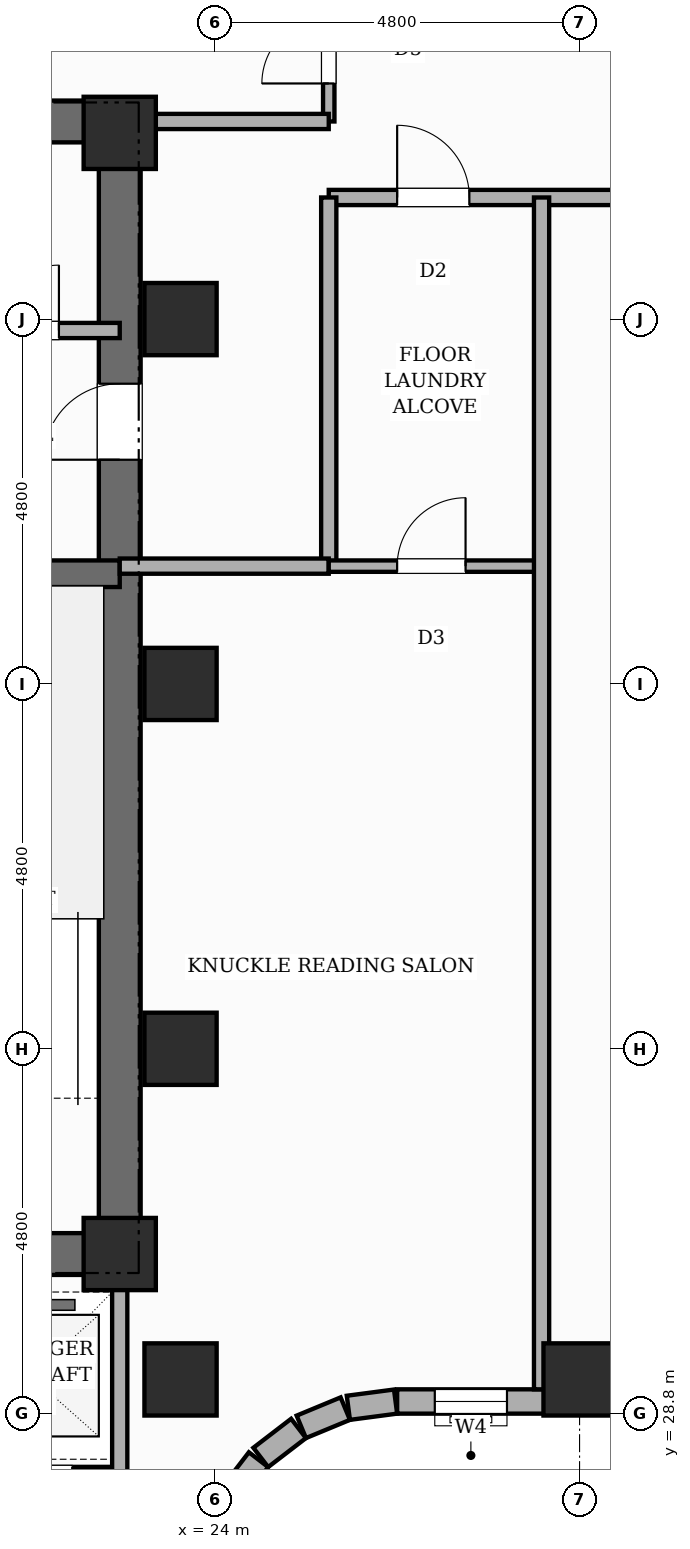
"""IFC4 building model, lengths in metres.
Left out: names, types, materials, properties, quantities, classifications, styles, units other than length and angle.
Written with IfcOpenShell. Run it as: python <this file> out.ifc"""

import sys

from ifc_helpers import new_model, si_unit, direction, frame, frame_2d, origin, origin_2d, place, context, subcontext, project, spatial, rectangle, extrude, element, fill, save


model = new_model("IFC4")
c1 = context("Model", 3, precision=1e-05, world=origin(), true_north=direction((0.0, 1.0)))
c2 = subcontext(c1, "Body", "Model", "MODEL_VIEW")
j1 = project(units=[si_unit("LENGTHUNIT", "METRE"), si_unit("PLANEANGLEUNIT", "RADIAN")], contexts=[c1])
p1 = place(None, origin())
s1 = spatial("IfcSite", under=j1, at=p1, CompositionType="ELEMENT")
p2 = place(p1, origin())
s2 = spatial("IfcBuilding", under=s1, at=p2, CompositionType="ELEMENT")
p3 = place(p2, frame((0.0, 0.0, 110.8)))
s3 = spatial("IfcBuildingStorey", under=s2, at=p3, CompositionType="ELEMENT", Elevation=110.8)
p4 = place(p3, frame((22.75, 30.625, 0.0), z_axis=(0.0, 0.0, 1.0), x_axis=(0.0, 1.0, 0.0)))
e1 = element("IfcWall", 1, at=p4, inside=s3, PredefinedType="SHEAR", context=c2, shape_type="SweptSolid", body=[
    extrude(rectangle(XDim=15.45, YDim=0.55, at=frame_2d((7.725, 0.0))), origin(), (0.0, 0.0, 1.0), 3.6),
])
p5 = place(p4, frame((10.725, 0.0, 0.0)))
e2 = element("IfcOpeningElement", 2, at=p5, cuts=e1, PredefinedType="OPENING", context=c2, shape_type="SweptSolid", body=[
    extrude(rectangle(XDim=1.0, YDim=2.15, at=frame_2d((0.5, 1.075))), frame((0.0, 0.285, 0.0), z_axis=(0.0, -1.0, 0.0), x_axis=(1.0, 0.0, 0.0)), (0.0, 0.0, 1.0), 0.57),
])
p6 = place(p3, frame((6.05, 45.8, 0.0), z_axis=(0.0, 0.0, 1.0), x_axis=(1.0, 0.0, 0.0)))
e3 = element("IfcWall", 3, at=p6, inside=s3, PredefinedType="SHEAR", context=c2, shape_type="SweptSolid", body=[
    extrude(rectangle(XDim=16.7, YDim=0.55, at=frame_2d((8.35, 0.0))), origin(), (0.0, 0.0, 1.0), 3.6),
])
p7 = place(p3, frame((18.84, 30.9, 0.0), z_axis=(0.0, 0.0, 1.0), x_axis=(1.0, 0.0, 0.0)))
e4 = element("IfcWall", 4, at=p7, inside=s3, PredefinedType="SHEAR", context=c2, shape_type="SweptSolid", body=[
    extrude(rectangle(XDim=3.91, YDim=0.55, at=frame_2d((1.955, 0.0))), origin(), (0.0, 0.0, 1.0), 3.6),
])
p8 = place(p3, frame((18.84, 39.85, 0.0), z_axis=(0.0, 0.0, 1.0), x_axis=(1.0, 0.0, 0.0)))
e5 = element("IfcWall", 5, at=p8, inside=s3, PredefinedType="SHEAR", context=c2, shape_type="SweptSolid", body=[
    extrude(rectangle(XDim=3.91, YDim=0.35, at=frame_2d((1.955, 0.0))), origin(), (0.0, 0.0, 1.0), 3.6),
])
for number, where, z_axis, x_axis in (
    (6, (22.75, 30.9, 0.0), (0.0, 0.0, 1.0), (1.0, 0.0, 0.0)),
    (7, (22.75, 45.65, 0.0), (0.0, 0.0, 1.0), (1.0, 0.0, 0.0)),
    (8, (23.55, 29.25, 0.0), (0.0, 0.0, 1.0), (1.0, 0.0, 0.0)),
    (9, (23.55, 33.6, 0.0), (0.0, 0.0, 1.0), (1.0, 0.0, 0.0)),
    (10, (23.55, 38.4, 0.0), (0.0, 0.0, 1.0), (1.0, 0.0, 0.0)),
    (11, (23.55, 43.2, 0.0), (0.0, 0.0, 1.0), (1.0, 0.0, 0.0)),
    (12, (28.8, 29.25, 0.0), (0.0, 0.0, 1.0), (1.0, 0.0, 0.0)),
):
    element("IfcColumn", number, at=place(p3, frame(where, z_axis=z_axis, x_axis=x_axis)), inside=s3, PredefinedType="COLUMN", context=c2, shape_type="SweptSolid", body=[
        extrude(rectangle(XDim=0.95, YDim=0.95, at=origin_2d()), origin(), (0.0, 0.0, 1.0), 3.6),
    ])
p9 = place(p3, frame((50.4, 28.96, 0.0), z_axis=(0.0, 0.0, 1.0), x_axis=(-1.0, 0.0, 0.0)))
e13 = element("IfcWall", 13, at=p9, inside=s3, PredefinedType="STANDARD", context=c2, shape_type="SweptSolid", body=[
    extrude(rectangle(XDim=24.0, YDim=0.32, at=frame_2d((12.0, 0.0))), origin(), (0.0, 0.0, 1.0), 2.54),
])
p10 = place(p9, frame((19.278, 0.0, 0.65)))
e14 = element("IfcOpeningElement", 14, at=p10, cuts=e13, PredefinedType="OPENING", context=c2, shape_type="SweptSolid", body=[
    extrude(rectangle(XDim=1.4, YDim=1.1, at=frame_2d((0.7, 0.55))), frame((0.0, 0.17, 0.0), z_axis=(0.0, -1.0, 0.0), x_axis=(1.0, 0.0, 0.0)), (0.0, 0.0, 1.0), 0.34),
])
p11 = place(p9, frame((13.76, 0.0, 0.65)))
e15 = element("IfcOpeningElement", 15, at=p11, cuts=e13, PredefinedType="OPENING", context=c2, shape_type="SweptSolid", body=[
    extrude(rectangle(XDim=1.4, YDim=1.1, at=frame_2d((0.7, 0.55))), frame((0.0, 0.17, 0.0), z_axis=(0.0, -1.0, 0.0), x_axis=(1.0, 0.0, 0.0)), (0.0, 0.0, 1.0), 0.34),
])
p12 = place(p9, frame((22.555, 0.0, 0.45)))
e16 = element("IfcOpeningElement", 16, at=p12, cuts=e13, PredefinedType="OPENING", context=c2, shape_type="SweptSolid", body=[
    extrude(rectangle(XDim=0.95, YDim=1.8, at=frame_2d((0.475, 0.9))), frame((0.0, 0.17, 0.0), z_axis=(0.0, -1.0, 0.0), x_axis=(1.0, 0.0, 0.0)), (0.0, 0.0, 1.0), 0.34),
])
p13 = place(p9, frame((4.1, 0.0, 0.65)))
e17 = element("IfcOpeningElement", 17, at=p13, cuts=e13, PredefinedType="OPENING", context=c2, shape_type="SweptSolid", body=[
    extrude(rectangle(XDim=1.4, YDim=1.1, at=frame_2d((0.7, 0.55))), frame((0.0, 0.17, 0.0), z_axis=(0.0, -1.0, 0.0), x_axis=(1.0, 0.0, 0.0)), (0.0, 0.0, 1.0), 0.34),
])
p14 = place(p9, frame((17.598, 0.0, 0.45)))
e18 = element("IfcOpeningElement", 18, at=p14, cuts=e13, PredefinedType="OPENING", context=c2, shape_type="SweptSolid", body=[
    extrude(rectangle(XDim=0.95, YDim=1.8, at=frame_2d((0.475, 0.9))), frame((0.0, 0.17, 0.0), z_axis=(0.0, -1.0, 0.0), x_axis=(1.0, 0.0, 0.0)), (0.0, 0.0, 1.0), 0.34),
])
p15 = place(p9, frame((9.413, 0.0, 0.65)))
e19 = element("IfcOpeningElement", 19, at=p15, cuts=e13, PredefinedType="OPENING", context=c2, shape_type="SweptSolid", body=[
    extrude(rectangle(XDim=1.4, YDim=1.1, at=frame_2d((0.7, 0.55))), frame((0.0, 0.17, 0.0), z_axis=(0.0, -1.0, 0.0), x_axis=(1.0, 0.0, 0.0)), (0.0, 0.0, 1.0), 0.34),
])
p16 = place(p9, frame((0.656, 0.0, 0.45)))
e20 = element("IfcOpeningElement", 20, at=p16, cuts=e13, PredefinedType="OPENING", context=c2, shape_type="SweptSolid", body=[
    extrude(rectangle(XDim=0.95, YDim=1.8, at=frame_2d((0.475, 0.9))), frame((0.0, 0.17, 0.0), z_axis=(0.0, -1.0, 0.0), x_axis=(1.0, 0.0, 0.0)), (0.0, 0.0, 1.0), 0.34),
])
p17 = place(p3, frame((26.379, 28.958, 0.0), z_axis=(0.0, 0.0, 1.0), x_axis=(-0.991447664465, -0.130504898859, 0.0)))
e21 = element("IfcWall", 21, at=p17, inside=s3, PredefinedType="STANDARD", context=c2, shape_type="SweptSolid", body=[
    extrude(rectangle(XDim=0.627, YDim=0.32, at=frame_2d((0.313, 0.0))), origin(), (0.0, 0.0, 1.0), 2.54),
])
p18 = place(p3, frame((25.718, 28.866, 0.0), z_axis=(0.0, 0.0, 1.0), x_axis=(-0.923836271867, -0.382787856107, 0.0)))
e22 = element("IfcWall", 22, at=p18, inside=s3, PredefinedType="STANDARD", context=c2, shape_type="SweptSolid", body=[
    extrude(rectangle(XDim=0.626, YDim=0.32, at=frame_2d((0.313, 0.0))), origin(), (0.0, 0.0, 1.0), 3.36),
])
for number, where, z_axis, x_axis in (
    (23, (25.103, 28.605, 0.0), (0.0, 0.0, 1.0), (-0.793, -0.609, 0.0)),
    (24, (24.576, 28.195, 0.0), (0.0, 0.0, 1.0), (-0.609, -0.793, 0.0)),
):
    element("IfcWall", number, at=place(p3, frame(where, z_axis=z_axis, x_axis=x_axis)), inside=s3, PredefinedType="STANDARD", context=c2, shape_type="SweptSolid", body=[
        extrude(rectangle(XDim=0.626, YDim=0.32, at=frame_2d((0.313, 0.0))), origin(), (0.0, 0.0, 1.0), 3.36),
    ])
p19 = place(p3, frame((18.84, 43.05, 0.0), z_axis=(0.0, 0.0, 1.0), x_axis=(1.0, 0.0, 0.0)))
e25 = element("IfcWall", 25, at=p19, inside=s3, PredefinedType="POLYGONAL", context=c2, shape_type="SweptSolid", body=[
    extrude(rectangle(XDim=3.91, YDim=0.2, at=frame_2d((1.955, 0.0))), origin(), (0.0, 0.0, 1.0), 2.54),
])
p20 = place(p19, frame((0.55, 0.0, 0.0)))
e26 = element("IfcOpeningElement", 26, at=p20, cuts=e25, PredefinedType="OPENING", context=c2, shape_type="SweptSolid", body=[
    extrude(rectangle(XDim=0.88, YDim=2.1, at=frame_2d((0.44, 1.05))), frame((0.0, 0.11, 0.0), z_axis=(0.0, -1.0, 0.0), x_axis=(1.0, 0.0, 0.0)), (0.0, 0.0, 1.0), 0.22),
])
p21 = place(p19, frame((2.25, 0.0, 0.0)))
e27 = element("IfcOpeningElement", 27, at=p21, cuts=e25, PredefinedType="OPENING", context=c2, shape_type="SweptSolid", body=[
    extrude(rectangle(XDim=0.86, YDim=2.1, at=frame_2d((0.43, 1.05))), frame((0.0, 0.11, 0.0), z_axis=(0.0, -1.0, 0.0), x_axis=(1.0, 0.0, 0.0)), (0.0, 0.0, 1.0), 0.22),
])
p22 = place(p3, frame((15.5, 28.0, 0.0), z_axis=(0.0, 0.0, 1.0), x_axis=(1.0, 0.0, 0.0)))
e28 = element("IfcWall", 28, at=p22, inside=s3, PredefinedType="POLYGONAL", context=c2, shape_type="SweptSolid", body=[
    extrude(rectangle(XDim=7.25, YDim=0.2, at=frame_2d((3.625, 0.0))), origin(), (0.0, 0.0, 1.0), 3.36),
])
p23 = place(p22, frame((0.625, 0.0, 0.0)))
e29 = element("IfcOpeningElement", 29, at=p23, cuts=e28, PredefinedType="OPENING", context=c2, shape_type="SweptSolid", body=[
    extrude(rectangle(XDim=1.1, YDim=2.15, at=frame_2d((0.55, 1.075))), frame((0.0, 0.11, 0.0), z_axis=(0.0, -1.0, 0.0), x_axis=(1.0, 0.0, 0.0)), (0.0, 0.0, 1.0), 0.22),
])
p24 = place(p22, frame((3.075, 0.0, 0.0)))
e30 = element("IfcOpeningElement", 30, at=p24, cuts=e28, PredefinedType="OPENING", context=c2, shape_type="SweptSolid", body=[
    extrude(rectangle(XDim=1.1, YDim=2.15, at=frame_2d((0.55, 1.075))), frame((0.0, 0.11, 0.0), z_axis=(0.0, -1.0, 0.0), x_axis=(1.0, 0.0, 0.0)), (0.0, 0.0, 1.0), 0.22),
])
p25 = place(p22, frame((5.525, 0.0, 0.0)))
e31 = element("IfcOpeningElement", 31, at=p25, cuts=e28, PredefinedType="OPENING", context=c2, shape_type="SweptSolid", body=[
    extrude(rectangle(XDim=1.1, YDim=2.15, at=frame_2d((0.55, 1.075))), frame((0.0, 0.11, 0.0), z_axis=(0.0, -1.0, 0.0), x_axis=(1.0, 0.0, 0.0)), (0.0, 0.0, 1.0), 0.22),
])
p26 = place(p3, frame((22.75, 27.9, 0.0), z_axis=(0.0, 0.0, 1.0), x_axis=(0.0, 1.0, 0.0)))
e32 = element("IfcWall", 32, at=p26, inside=s3, PredefinedType="POLYGONAL", context=c2, shape_type="SweptSolid", body=[
    extrude(rectangle(XDim=3.0, YDim=0.2, at=frame_2d((1.5, 0.0))), origin(), (0.0, 0.0, 1.0), 3.36),
])
p27 = place(p3, frame((25.5, 45.8, 0.0), z_axis=(0.0, 0.0, 1.0), x_axis=(0.0, 1.0, 0.0)))
e33 = element("IfcWall", 33, at=p27, inside=s3, PredefinedType="PARTITIONING", context=c2, shape_type="SweptSolid", body=[
    extrude(rectangle(XDim=1.88, YDim=0.15, at=frame_2d((0.94, 0.0))), origin(), (0.0, 0.0, 1.0), 3.36),
])
p28 = place(p27, frame((0.5, 0.0, 0.0)))
e34 = element("IfcOpeningElement", 34, at=p28, cuts=e33, PredefinedType="OPENING", context=c2, shape_type="SweptSolid", body=[
    extrude(rectangle(XDim=0.88, YDim=2.1, at=frame_2d((0.44, 1.05))), frame((0.0, 0.085, 0.0), z_axis=(0.0, -1.0, 0.0), x_axis=(1.0, 0.0, 0.0)), (0.0, 0.0, 1.0), 0.17),
])
p29 = place(p3, frame((22.75, 45.8, 0.0), z_axis=(0.0, 0.0, 1.0), x_axis=(1.0, 0.0, 0.0)))
e35 = element("IfcWall", 35, at=p29, inside=s3, PredefinedType="PARTITIONING", context=c2, shape_type="SweptSolid", body=[
    extrude(rectangle(XDim=2.75, YDim=0.2, at=frame_2d((1.375, 0.0))), origin(), (0.0, 0.0, 1.0), 3.36),
])
p30 = place(p3, frame((25.5, 44.8, 0.0), z_axis=(0.0, 0.0, 1.0), x_axis=(1.0, 0.0, 0.0)))
e36 = element("IfcWall", 36, at=p30, inside=s3, PredefinedType="PARTITIONING", context=c2, shape_type="SweptSolid", body=[
    extrude(rectangle(XDim=16.28, YDim=0.2, at=frame_2d((8.14, 0.0))), origin(), (0.0, 0.0, 1.0), 3.36),
])
p31 = place(p30, frame((0.9, 0.0, 0.0)))
e37 = element("IfcOpeningElement", 37, at=p31, cuts=e36, PredefinedType="OPENING", context=c2, shape_type="SweptSolid", body=[
    extrude(rectangle(XDim=0.95, YDim=2.15, at=frame_2d((0.475, 1.075))), frame((0.0, 0.11, 0.0), z_axis=(0.0, -1.0, 0.0), x_axis=(1.0, 0.0, 0.0)), (0.0, 0.0, 1.0), 0.22),
])
p32 = place(p30, frame((3.988, 0.0, 0.0)))
e38 = element("IfcOpeningElement", 38, at=p32, cuts=e36, PredefinedType="OPENING", context=c2, shape_type="SweptSolid", body=[
    extrude(rectangle(XDim=0.98, YDim=2.18, at=frame_2d((0.49, 1.09))), frame((0.0, 0.11, 0.0), z_axis=(0.0, -1.0, 0.0), x_axis=(1.0, 0.0, 0.0)), (0.0, 0.0, 1.0), 0.22),
])
p33 = place(p30, frame((9.99, 0.0, 0.0)))
e39 = element("IfcOpeningElement", 39, at=p33, cuts=e36, PredefinedType="OPENING", context=c2, shape_type="SweptSolid", body=[
    extrude(rectangle(XDim=0.98, YDim=2.18, at=frame_2d((0.49, 1.09))), frame((0.0, 0.11, 0.0), z_axis=(0.0, -1.0, 0.0), x_axis=(1.0, 0.0, 0.0)), (0.0, 0.0, 1.0), 0.22),
])
p34 = place(p3, frame((25.5, 39.95, 0.0), z_axis=(0.0, 0.0, 1.0), x_axis=(0.0, 1.0, 0.0)))
e40 = element("IfcWall", 40, at=p34, inside=s3, PredefinedType="PARTITIONING", context=c2, shape_type="SweptSolid", body=[
    extrude(rectangle(XDim=4.85, YDim=0.2, at=frame_2d((2.425, 0.0))), origin(), (0.0, 0.0, 1.0), 3.36),
])
p35 = place(p3, frame((22.75, 39.95, 0.0), z_axis=(0.0, 0.0, 1.0), x_axis=(1.0, 0.0, 0.0)))
e41 = element("IfcWall", 41, at=p35, inside=s3, PredefinedType="PARTITIONING", context=c2, shape_type="SweptSolid", body=[
    extrude(rectangle(XDim=2.75, YDim=0.2, at=frame_2d((1.375, 0.0))), origin(), (0.0, 0.0, 1.0), 3.36),
])
p36 = place(p3, frame((25.5, 39.95, 0.0), z_axis=(0.0, 0.0, 1.0), x_axis=(1.0, 0.0, 0.0)))
e42 = element("IfcWall", 42, at=p36, inside=s3, PredefinedType="PARTITIONING", context=c2, shape_type="SweptSolid", body=[
    extrude(rectangle(XDim=2.8, YDim=0.15, at=frame_2d((1.4, 0.0))), origin(), (0.0, 0.0, 1.0), 3.36),
])
p37 = place(p36, frame((0.9, 0.0, 0.0)))
e43 = element("IfcOpeningElement", 43, at=p37, cuts=e42, PredefinedType="OPENING", context=c2, shape_type="SweptSolid", body=[
    extrude(rectangle(XDim=0.9, YDim=2.15, at=frame_2d((0.45, 1.075))), frame((0.0, 0.085, 0.0), z_axis=(0.0, -1.0, 0.0), x_axis=(1.0, 0.0, 0.0)), (0.0, 0.0, 1.0), 0.17),
])
p38 = place(p3, frame((28.3, 29.12, 0.0), z_axis=(0.0, 0.0, 1.0), x_axis=(0.0, 1.0, 0.0)))
e44 = element("IfcWall", 44, at=p38, inside=s3, PredefinedType="SOLIDWALL", context=c2, shape_type="SweptSolid", body=[
    extrude(rectangle(XDim=15.68, YDim=0.2, at=frame_2d((7.84, 0.0))), origin(), (0.0, 0.0, 1.0), 3.36),
])
p39 = place(p12, origin())
e45 = element("IfcWindow", 45, at=p39, inside=s3, PartitioningType="SINGLE_PANEL", PredefinedType="WINDOW", context=c2, shape_type="SweptSolid", body=[
    extrude(rectangle(XDim=0.95, YDim=1.8, at=frame_2d((0.475, 0.9))), frame((0.0, 0.03, 0.0), z_axis=(0.0, -1.0, 0.0), x_axis=(1.0, 0.0, 0.0)), (0.0, 0.0, 1.0), 0.06),
])
fill(e16, e45)
p40 = place(p5, origin())
e46 = element("IfcDoor", 46, at=p40, inside=s3, OperationType="SINGLE_SWING_LEFT", PredefinedType="DOOR", context=c2, shape_type="SweptSolid", body=[
    extrude(rectangle(XDim=1.0, YDim=2.15, at=frame_2d((0.5, 1.075))), frame((0.0, 0.025, 0.0), z_axis=(0.0, -1.0, 0.0), x_axis=(1.0, 0.0, 0.0)), (0.0, 0.0, 1.0), 0.05),
])
fill(e2, e46)
p41 = place(p21, origin())
e47 = element("IfcDoor", 47, at=p41, inside=s3, OperationType="SINGLE_SWING_RIGHT", PredefinedType="DOOR", context=c2, shape_type="SweptSolid", body=[
    extrude(rectangle(XDim=0.86, YDim=2.1, at=frame_2d((0.43, 1.05))), frame((0.0, 0.025, 0.0), z_axis=(0.0, -1.0, 0.0), x_axis=(1.0, 0.0, 0.0)), (0.0, 0.0, 1.0), 0.05),
])
fill(e27, e47)
p42 = place(p28, origin())
e48 = element("IfcDoor", 48, at=p42, inside=s3, OperationType="SINGLE_SWING_LEFT", PredefinedType="DOOR", context=c2, shape_type="SweptSolid", body=[
    extrude(rectangle(XDim=0.88, YDim=2.1, at=frame_2d((0.44, 1.05))), frame((0.0, 0.025, 0.0), z_axis=(0.0, -1.0, 0.0), x_axis=(1.0, 0.0, 0.0)), (0.0, 0.0, 1.0), 0.05),
])
fill(e34, e48)
p43 = place(p31, origin())
e49 = element("IfcDoor", 49, at=p43, inside=s3, OperationType="SINGLE_SWING_LEFT", PredefinedType="DOOR", context=c2, shape_type="SweptSolid", body=[
    extrude(rectangle(XDim=0.95, YDim=2.15, at=frame_2d((0.475, 1.075))), frame((0.0, 0.025, 0.0), z_axis=(0.0, -1.0, 0.0), x_axis=(1.0, 0.0, 0.0)), (0.0, 0.0, 1.0), 0.05),
])
fill(e37, e49)
p44 = place(p37, origin())
e50 = element("IfcDoor", 50, at=p44, inside=s3, OperationType="SINGLE_SWING_RIGHT", PredefinedType="DOOR", context=c2, shape_type="SweptSolid", body=[
    extrude(rectangle(XDim=0.9, YDim=2.15, at=frame_2d((0.45, 1.075))), frame((0.0, 0.025, 0.0), z_axis=(0.0, -1.0, 0.0), x_axis=(1.0, 0.0, 0.0)), (0.0, 0.0, 1.0), 0.05),
])
fill(e43, e50)
save(model, sys.argv[1])
